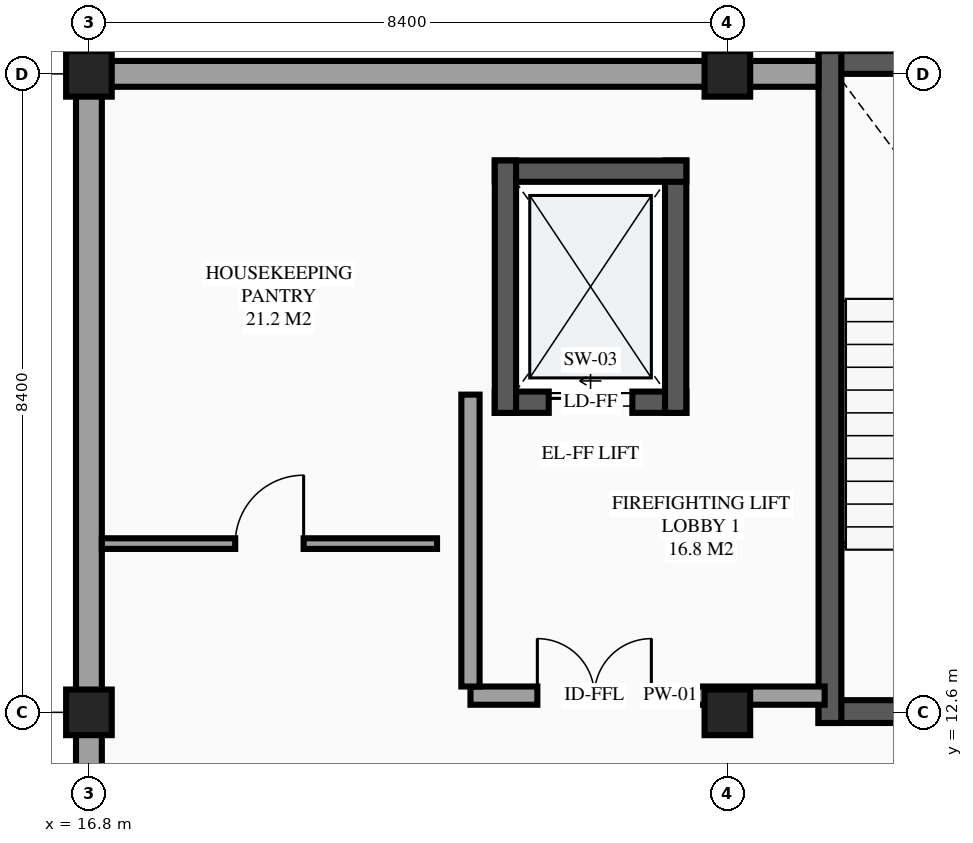
"""IFC4 building model, lengths in metres.
Left out: names, types, materials, properties, quantities, classifications, styles, units other than length and angle.
Written with IfcOpenShell. Run it as: python <this file> out.ifc"""

import sys

from ifc_helpers import new_model, si_unit, direction, frame, frame_2d, origin, origin_2d, place, context, subcontext, project, spatial, rectangle, extrude, element, fill, save


model = new_model("IFC4")
c1 = context("Model", 3, precision=1e-05, world=origin(), true_north=direction((0.0, 1.0)))
c2 = subcontext(c1, "Body", "Model", "MODEL_VIEW")
j1 = project(units=[si_unit("LENGTHUNIT", "METRE"), si_unit("PLANEANGLEUNIT", "RADIAN")], contexts=[c1])
p1 = place(None, origin())
s1 = spatial("IfcSite", under=j1, at=p1, CompositionType="ELEMENT")
p2 = place(p1, origin())
s2 = spatial("IfcBuilding", under=s1, at=p2, CompositionType="ELEMENT")
p3 = place(p2, frame((0.0, 0.0, 25.5)))
s3 = spatial("IfcBuildingStorey", under=s2, at=p3, CompositionType="ELEMENT", Elevation=25.5)
for number, where, z_axis, x_axis in (
    (1, (16.8, 12.6, 0.0), (0.0, 0.0, 1.0), (1.0, 0.0, 0.0)),
    (2, (16.8, 21.0, 0.0), (0.0, 0.0, 1.0), (1.0, 0.0, 0.0)),
    (3, (25.2, 12.6, 0.0), (0.0, 0.0, 1.0), (1.0, 0.0, 0.0)),
    (4, (25.2, 21.0, 0.0), (0.0, 0.0, 1.0), (1.0, 0.0, 0.0)),
):
    element("IfcColumn", number, at=place(p3, frame(where, z_axis=z_axis, x_axis=x_axis)), inside=s3, PredefinedType="COLUMN", context=c2, shape_type="SweptSolid", body=[
        extrude(rectangle(XDim=0.6, YDim=0.6, at=origin_2d()), origin(), (0.0, 0.0, 1.0), 3.6),
    ])
p4 = place(p3, frame((25.2, 21.0, 0.0), z_axis=(0.0, 0.0, 1.0), x_axis=(-1.0, 0.0, 0.0)))
e5 = element("IfcWall", 5, at=p4, inside=s3, PredefinedType="STANDARD", context=c2, shape_type="SweptSolid", body=[
    extrude(rectangle(XDim=8.4, YDim=0.34, at=frame_2d((4.2, 0.0))), origin(), (0.0, 0.0, 1.0), 3.07),
])
p5 = place(p3, frame((16.8, 21.0, 0.0), z_axis=(0.0, 0.0, 1.0), x_axis=(0.0, -1.0, 0.0)))
e6 = element("IfcWall", 6, at=p5, inside=s3, PredefinedType="STANDARD", context=c2, shape_type="SweptSolid", body=[
    extrude(rectangle(XDim=8.4, YDim=0.34, at=frame_2d((4.2, 0.0))), origin(), (0.0, 0.0, 1.0), 2.73),
])
p6 = place(p3, frame((22.14, 16.68, 0.0), z_axis=(0.0, 0.0, 1.0), x_axis=(1.0, 0.0, 0.0)))
e7 = element("IfcWall", 7, at=p6, inside=s3, PredefinedType="SHEAR", context=c2, shape_type="SweptSolid", body=[
    extrude(rectangle(XDim=2.52, YDim=0.28, at=frame_2d((1.26, 0.0))), origin(), (0.0, 0.0, 1.0), 3.6),
])
p7 = place(p6, frame((0.71, 0.0, 0.0)))
e8 = element("IfcOpeningElement", 8, at=p7, cuts=e7, PredefinedType="OPENING", context=c2, shape_type="SweptSolid", body=[
    extrude(rectangle(XDim=1.1, YDim=2.2, at=frame_2d((0.55, 1.1))), frame((0.0, 0.15, 0.0), z_axis=(0.0, -1.0, 0.0), x_axis=(1.0, 0.0, 0.0)), (0.0, 0.0, 1.0), 0.3),
])
p8 = place(p3, frame((24.52, 16.54, 0.0), z_axis=(0.0, 0.0, 1.0), x_axis=(0.0, 1.0, 0.0)))
e9 = element("IfcWall", 9, at=p8, inside=s3, PredefinedType="SHEAR", context=c2, shape_type="SweptSolid", body=[
    extrude(rectangle(XDim=3.32, YDim=0.28, at=frame_2d((1.66, 0.0))), origin(), (0.0, 0.0, 1.0), 3.6),
])
p9 = place(p3, frame((24.66, 19.72, 0.0), z_axis=(0.0, 0.0, 1.0), x_axis=(-1.0, 0.0, 0.0)))
e10 = element("IfcWall", 10, at=p9, inside=s3, PredefinedType="SHEAR", context=c2, shape_type="SweptSolid", body=[
    extrude(rectangle(XDim=2.52, YDim=0.28, at=frame_2d((1.26, 0.0))), origin(), (0.0, 0.0, 1.0), 3.6),
])
p10 = place(p3, frame((22.28, 19.86, 0.0), z_axis=(0.0, 0.0, 1.0), x_axis=(0.0, -1.0, 0.0)))
e11 = element("IfcWall", 11, at=p10, inside=s3, PredefinedType="SHEAR", context=c2, shape_type="SweptSolid", body=[
    extrude(rectangle(XDim=3.32, YDim=0.28, at=frame_2d((1.66, 0.0))), origin(), (0.0, 0.0, 1.0), 3.6),
])
p11 = place(p3, frame((26.4, 12.61, 0.0), z_axis=(0.0, 0.0, 1.0), x_axis=(1.0, 0.0, 0.0)))
e12 = element("IfcWall", 12, at=p11, inside=s3, PredefinedType="SHEAR", context=c2, shape_type="SweptSolid", body=[
    extrude(rectangle(XDim=5.2, YDim=0.3, at=frame_2d((2.6, 0.0))), origin(), (0.0, 0.0, 1.0), 3.6),
])
p12 = place(p11, frame((2.025, 0.0, 0.0)))
e13 = element("IfcOpeningElement", 13, at=p12, cuts=e12, PredefinedType="OPENING", context=c2, shape_type="SweptSolid", body=[
    extrude(rectangle(XDim=1.15, YDim=2.15, at=frame_2d((0.575, 1.075))), frame((0.0, 0.16, 0.0), z_axis=(0.0, -1.0, 0.0), x_axis=(1.0, 0.0, 0.0)), (0.0, 0.0, 1.0), 0.32),
])
p13 = place(p3, frame((31.6, 21.15, 0.0), z_axis=(0.0, 0.0, 1.0), x_axis=(-1.0, 0.0, 0.0)))
e14 = element("IfcWall", 14, at=p13, inside=s3, PredefinedType="SHEAR", context=c2, shape_type="SweptSolid", body=[
    extrude(rectangle(XDim=5.2, YDim=0.3, at=frame_2d((2.6, 0.0))), origin(), (0.0, 0.0, 1.0), 3.6),
])
p14 = place(p3, frame((26.55, 21.3, 0.0), z_axis=(0.0, 0.0, 1.0), x_axis=(0.0, -1.0, 0.0)))
e15 = element("IfcWall", 15, at=p14, inside=s3, PredefinedType="SHEAR", context=c2, shape_type="SweptSolid", body=[
    extrude(rectangle(XDim=8.84, YDim=0.3, at=frame_2d((4.42, 0.0))), origin(), (0.0, 0.0, 1.0), 3.6),
])
p15 = place(p3, frame((21.82, 12.82, 0.0), z_axis=(0.0, 0.0, 1.0), x_axis=(1.0, 0.0, 0.0)))
e16 = element("IfcWall", 16, at=p15, inside=s3, PredefinedType="PARTITIONING", context=c2, shape_type="SweptSolid", body=[
    extrude(rectangle(XDim=4.66, YDim=0.24, at=frame_2d((2.33, 0.0))), origin(), (0.0, 0.0, 1.0), 2.43),
])
p16 = place(p15, frame((0.88, 0.0, 0.0)))
e17 = element("IfcOpeningElement", 17, at=p16, cuts=e16, PredefinedType="OPENING", context=c2, shape_type="SweptSolid", body=[
    extrude(rectangle(XDim=1.5, YDim=2.15, at=frame_2d((0.75, 1.075))), frame((0.0, 0.13, 0.0), z_axis=(0.0, -1.0, 0.0), x_axis=(1.0, 0.0, 0.0)), (0.0, 0.0, 1.0), 0.26),
])
p17 = place(p3, frame((21.82, 12.94, 0.0), z_axis=(0.0, 0.0, 1.0), x_axis=(0.0, 1.0, 0.0)))
e18 = element("IfcWall", 18, at=p17, inside=s3, PredefinedType="PARTITIONING", context=c2, shape_type="SweptSolid", body=[
    extrude(rectangle(XDim=3.84, YDim=0.24, at=frame_2d((1.92, 0.0))), origin(), (0.0, 0.0, 1.0), 3.375),
])
p18 = place(p3, frame((16.97, 14.82, 0.0), z_axis=(0.0, 0.0, 1.0), x_axis=(1.0, 0.0, 0.0)))
e19 = element("IfcWall", 19, at=p18, inside=s3, PredefinedType="PARTITIONING", context=c2, shape_type="SweptSolid", body=[
    extrude(rectangle(XDim=4.41, YDim=0.14, at=frame_2d((2.205, 0.0))), origin(), (0.0, 0.0, 1.0), 3.375),
])
p19 = place(p18, frame((1.755, 0.0, 0.0)))
e20 = element("IfcOpeningElement", 20, at=p19, cuts=e19, PredefinedType="OPENING", context=c2, shape_type="SweptSolid", body=[
    extrude(rectangle(XDim=0.9, YDim=2.12, at=frame_2d((0.45, 1.06))), frame((0.0, 0.08, 0.0), z_axis=(0.0, -1.0, 0.0), x_axis=(1.0, 0.0, 0.0)), (0.0, 0.0, 1.0), 0.16),
])
p20 = place(p3, frame((26.4, 21.0, 0.0), z_axis=(0.0, 0.0, 1.0), x_axis=(-1.0, 0.0, 0.0)))
e21 = element("IfcWall", 21, at=p20, inside=s3, PredefinedType="STANDARD", context=c2, shape_type="SweptSolid", body=[
    extrude(rectangle(XDim=1.2, YDim=0.34, at=frame_2d((0.6, 0.0))), origin(), (0.0, 0.0, 1.0), 2.73),
])
p21 = place(p3, frame((16.8, 12.6, 0.0), z_axis=(0.0, 0.0, 1.0), x_axis=(0.0, -1.0, 0.0)))
e22 = element("IfcWall", 22, at=p21, inside=s3, PredefinedType="STANDARD", context=c2, shape_type="SweptSolid", body=[
    extrude(rectangle(XDim=2.6, YDim=0.34, at=frame_2d((1.3, 0.0))), origin(), (0.0, 0.0, 1.0), 3.07),
])
p22 = place(p7, origin())
e23 = element("IfcDoor", 23, at=p22, inside=s3, OperationType="SLIDING_TO_LEFT", PredefinedType="DOOR", context=c2, shape_type="SweptSolid", body=[
    extrude(rectangle(XDim=1.1, YDim=2.2, at=frame_2d((0.55, 1.1))), frame((0.0, 0.025, 0.0), z_axis=(0.0, -1.0, 0.0), x_axis=(1.0, 0.0, 0.0)), (0.0, 0.0, 1.0), 0.05),
])
fill(e8, e23)
p23 = place(p16, origin())
e24 = element("IfcDoor", 24, at=p23, inside=s3, OperationType="DOUBLE_DOOR_SINGLE_SWING", PredefinedType="DOOR", context=c2, shape_type="SweptSolid", body=[
    extrude(rectangle(XDim=1.5, YDim=2.15, at=frame_2d((0.75, 1.075))), frame((0.0, 0.025, 0.0), z_axis=(0.0, -1.0, 0.0), x_axis=(1.0, 0.0, 0.0)), (0.0, 0.0, 1.0), 0.05),
])
fill(e17, e24)
p24 = place(p19, origin())
e25 = element("IfcDoor", 25, at=p24, inside=s3, OperationType="SINGLE_SWING_RIGHT", PredefinedType="DOOR", context=c2, shape_type="SweptSolid", body=[
    extrude(rectangle(XDim=0.9, YDim=2.12, at=frame_2d((0.45, 1.06))), frame((0.0, 0.025, 0.0), z_axis=(0.0, -1.0, 0.0), x_axis=(1.0, 0.0, 0.0)), (0.0, 0.0, 1.0), 0.05),
])
fill(e20, e25)
save(model, sys.argv[1])
